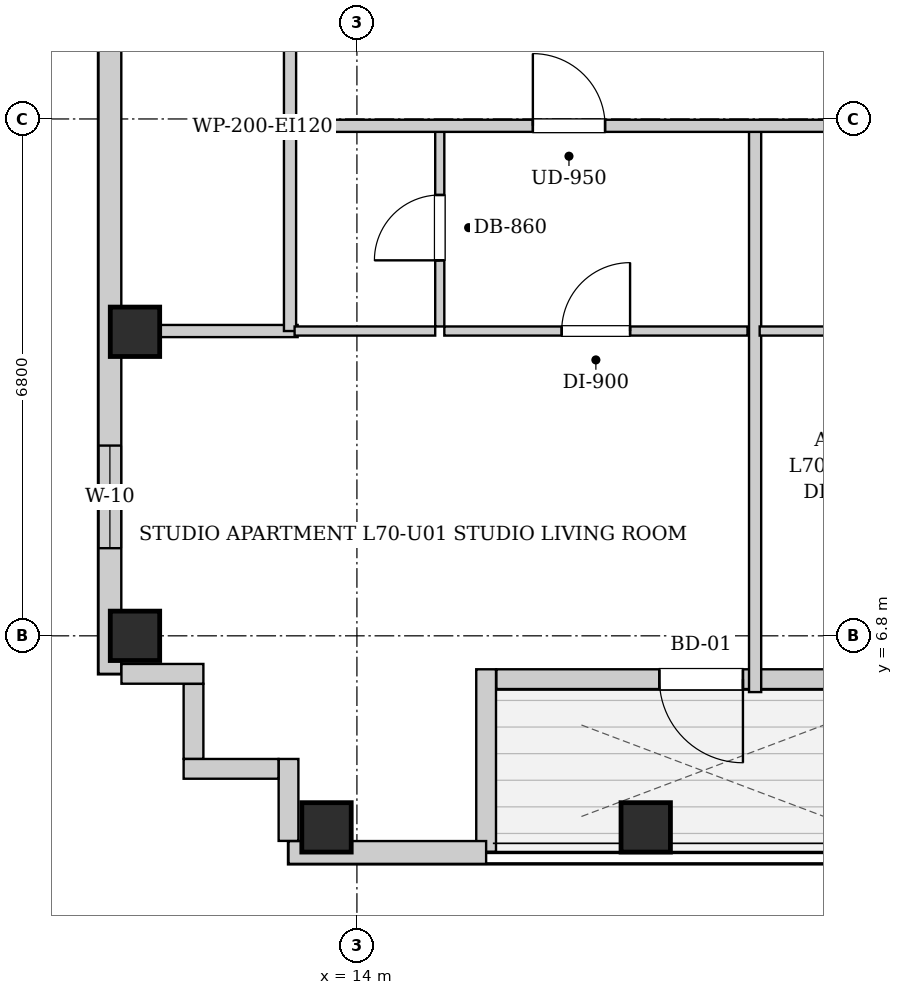
"""IFC4 building model, lengths in metres.
Left out: names, types, materials, properties, quantities, classifications, styles, units other than length and angle.
Written with IfcOpenShell. Run it as: python <this file> out.ifc"""

import sys

from ifc_helpers import new_model, si_unit, direction, frame, frame_2d, origin, origin_2d, place, context, subcontext, project, spatial, rectangle, extrude, element, fill, save


model = new_model("IFC4")
c1 = context("Model", 3, precision=1e-05, world=origin(), true_north=direction((0.0, 1.0)))
c2 = subcontext(c1, "Body", "Model", "MODEL_VIEW")
j1 = project(units=[si_unit("LENGTHUNIT", "METRE"), si_unit("PLANEANGLEUNIT", "RADIAN")], contexts=[c1])
p1 = place(None, origin())
s1 = spatial("IfcSite", under=j1, at=p1, CompositionType="ELEMENT")
p2 = place(p1, origin())
s2 = spatial("IfcBuilding", under=s1, at=p2, CompositionType="ELEMENT")
p3 = place(p2, frame((0.0, 0.0, 241.1)))
s3 = spatial("IfcBuildingStorey", under=s2, at=p3, CompositionType="ELEMENT", Elevation=241.1)
for number, where, z_axis, x_axis in (
    (1, (13.6, 4.28, 0.0), (0.0, 0.0, 1.0), (1.0, 0.0, 0.0)),
    (2, (17.8, 4.28, 0.0), (0.0, 0.0, 1.0), (1.0, 0.0, 0.0)),
    (3, (11.08, 6.8, 0.0), (0.0, 0.0, 1.0), (1.0, 0.0, 0.0)),
    (4, (11.08, 10.8, 0.0), (0.0, 0.0, 1.0), (1.0, 0.0, 0.0)),
):
    element("IfcColumn", number, at=place(p3, frame(where, z_axis=z_axis, x_axis=x_axis)), inside=s3, PredefinedType="COLUMN", context=c2, shape_type="SweptSolid", body=[
        extrude(rectangle(XDim=0.65, YDim=0.65, at=origin_2d()), origin(), (0.0, 0.0, 1.0), 3.4),
    ])
p4 = place(p3, frame((21.266, 6.23, 0.0), z_axis=(0.0, 0.0, 1.0), x_axis=(-1.0, 0.0, 0.0)))
e5 = element("IfcWall", 5, at=p4, inside=s3, PredefinedType="SOLIDWALL", context=c2, shape_type="SweptSolid", body=[
    extrude(rectangle(XDim=5.432, YDim=0.26, at=frame_2d((2.716, 0.0))), origin(), (0.0, 0.0, 1.0), 3.14),
])
p5 = place(p4, frame((2.187, 0.0, 0.0)))
e6 = element("IfcOpeningElement", 6, at=p5, cuts=e5, PredefinedType="OPENING", context=c2, shape_type="SweptSolid", body=[
    extrude(rectangle(XDim=1.1, YDim=2.0, at=frame_2d((0.55, 1.0))), frame((0.0, 0.14, 0.0), z_axis=(0.0, -1.0, 0.0), x_axis=(1.0, 0.0, 0.0)), (0.0, 0.0, 1.0), 0.28),
])
p6 = place(p3, frame((15.7, 6.36, 0.0), z_axis=(0.0, 0.0, 1.0), x_axis=(0.0, -1.0, 0.0)))
e7 = element("IfcWall", 7, at=p6, inside=s3, PredefinedType="SOLIDWALL", context=c2, shape_type="SweptSolid", body=[
    extrude(rectangle(XDim=2.4, YDim=0.26, at=frame_2d((1.2, 0.0))), origin(), (0.0, 0.0, 1.0), 3.14),
])
p7 = place(p3, frame((15.7, 3.95, 0.0), z_axis=(0.0, 0.0, 1.0), x_axis=(-1.0, 0.0, 0.0)))
e8 = element("IfcWall", 8, at=p7, inside=s3, PredefinedType="SOLIDWALL", context=c2, shape_type="SweptSolid", body=[
    extrude(rectangle(XDim=2.6, YDim=0.3, at=frame_2d((1.3, 0.0))), origin(), (0.0, 0.0, 1.0), 3.14),
])
p8 = place(p3, frame((10.75, 6.3, 0.0), z_axis=(0.0, 0.0, 1.0), x_axis=(0.0, 1.0, 0.0)))
e9 = element("IfcWall", 9, at=p8, inside=s3, PredefinedType="SOLIDWALL", context=c2, shape_type="SweptSolid", body=[
    extrude(rectangle(XDim=31.4, YDim=0.3, at=frame_2d((15.7, 0.0))), origin(), (0.0, 0.0, 1.0), 3.14),
])
p9 = place(p8, frame((1.653, 0.0, 0.55)))
e10 = element("IfcOpeningElement", 10, at=p9, cuts=e9, PredefinedType="OPENING", context=c2, shape_type="SweptSolid", body=[
    extrude(rectangle(XDim=1.35, YDim=1.2, at=frame_2d((0.675, 0.6))), frame((0.0, 0.16, 0.0), z_axis=(0.0, -1.0, 0.0), x_axis=(1.0, 0.0, 0.0)), (0.0, 0.0, 1.0), 0.32),
])
p10 = place(p8, frame((11.194, 0.0, 0.55)))
e11 = element("IfcOpeningElement", 11, at=p10, cuts=e9, PredefinedType="OPENING", context=c2, shape_type="SweptSolid", body=[
    extrude(rectangle(XDim=1.35, YDim=1.2, at=frame_2d((0.675, 0.6))), frame((0.0, 0.16, 0.0), z_axis=(0.0, -1.0, 0.0), x_axis=(1.0, 0.0, 0.0)), (0.0, 0.0, 1.0), 0.32),
])
p11 = place(p8, frame((9.185, 0.0, 0.55)))
e12 = element("IfcOpeningElement", 12, at=p11, cuts=e9, PredefinedType="OPENING", context=c2, shape_type="SweptSolid", body=[
    extrude(rectangle(XDim=1.35, YDim=1.2, at=frame_2d((0.675, 0.6))), frame((0.0, 0.16, 0.0), z_axis=(0.0, -1.0, 0.0), x_axis=(1.0, 0.0, 0.0)), (0.0, 0.0, 1.0), 0.32),
])
p12 = place(p8, frame((18.2, 0.0, 0.55)))
e13 = element("IfcOpeningElement", 13, at=p12, cuts=e9, PredefinedType="OPENING", context=c2, shape_type="SweptSolid", body=[
    extrude(rectangle(XDim=1.35, YDim=1.2, at=frame_2d((0.675, 0.6))), frame((0.0, 0.16, 0.0), z_axis=(0.0, -1.0, 0.0), x_axis=(1.0, 0.0, 0.0)), (0.0, 0.0, 1.0), 0.32),
])
p13 = place(p8, frame((19.81, 0.0, 0.55)))
e14 = element("IfcOpeningElement", 14, at=p13, cuts=e9, PredefinedType="OPENING", context=c2, shape_type="SweptSolid", body=[
    extrude(rectangle(XDim=1.35, YDim=1.2, at=frame_2d((0.675, 0.6))), frame((0.0, 0.16, 0.0), z_axis=(0.0, -1.0, 0.0), x_axis=(1.0, 0.0, 0.0)), (0.0, 0.0, 1.0), 0.32),
])
p14 = place(p3, frame((13.1, 4.102, 0.0), z_axis=(0.0, 0.0, 1.0), x_axis=(0.0, 1.0, 0.0)))
e15 = element("IfcWall", 15, at=p14, inside=s3, PredefinedType="SOLIDWALL", context=c2, shape_type="SweptSolid", body=[
    extrude(rectangle(XDim=1.078, YDim=0.26, at=frame_2d((0.539, 0.0))), origin(), (0.0, 0.0, 1.0), 3.14),
])
p15 = place(p3, frame((12.968, 5.05, 0.0), z_axis=(0.0, 0.0, 1.0), x_axis=(-1.0, 0.0, 0.0)))
e16 = element("IfcWall", 16, at=p15, inside=s3, PredefinedType="SOLIDWALL", context=c2, shape_type="SweptSolid", body=[
    extrude(rectangle(XDim=1.248, YDim=0.26, at=frame_2d((0.624, 0.0))), origin(), (0.0, 0.0, 1.0), 3.14),
])
p16 = place(p3, frame((11.85, 5.182, 0.0), z_axis=(0.0, 0.0, 1.0), x_axis=(0.0, 1.0, 0.0)))
e17 = element("IfcWall", 17, at=p16, inside=s3, PredefinedType="SOLIDWALL", context=c2, shape_type="SweptSolid", body=[
    extrude(rectangle(XDim=0.986, YDim=0.26, at=frame_2d((0.493, 0.0))), origin(), (0.0, 0.0, 1.0), 3.14),
])
p17 = place(p3, frame((11.98, 6.3, 0.0), z_axis=(0.0, 0.0, 1.0), x_axis=(-1.0, 0.0, 0.0)))
e18 = element("IfcWall", 18, at=p17, inside=s3, PredefinedType="SOLIDWALL", context=c2, shape_type="SweptSolid", body=[
    extrude(rectangle(XDim=1.078, YDim=0.26, at=frame_2d((0.539, 0.0))), origin(), (0.0, 0.0, 1.0), 3.14),
])
p18 = place(p3, frame((13.12, 13.51, 0.0), z_axis=(0.0, 0.0, 1.0), x_axis=(0.0, 1.0, 0.0)))
e19 = element("IfcWall", 19, at=p18, inside=s3, PredefinedType="PARTITIONING", context=c2, shape_type="SweptSolid", body=[
    extrude(rectangle(XDim=1.58, YDim=0.16, at=frame_2d((0.79, 0.0))), origin(), (0.0, 0.0, 1.0), 3.14),
])
p19 = place(p3, frame((10.88, 10.81, 0.0), z_axis=(0.0, 0.0, 1.0), x_axis=(1.0, 0.0, 0.0)))
e20 = element("IfcWall", 20, at=p19, inside=s3, PredefinedType="PARTITIONING", context=c2, shape_type="SweptSolid", body=[
    extrude(rectangle(XDim=2.34, YDim=0.16, at=frame_2d((1.17, 0.0))), origin(), (0.0, 0.0, 1.0), 3.14),
])
p20 = place(p3, frame((13.12, 10.81, 0.0), z_axis=(0.0, 0.0, 1.0), x_axis=(0.0, 1.0, 0.0)))
e21 = element("IfcWall", 21, at=p20, inside=s3, PredefinedType="PARTITIONING", context=c2, shape_type="SweptSolid", body=[
    extrude(rectangle(XDim=2.66, YDim=0.16, at=frame_2d((1.33, 0.0))), origin(), (0.0, 0.0, 1.0), 3.14),
])
p21 = place(p3, frame((15.09, 10.87, 0.0), z_axis=(0.0, 0.0, 1.0), x_axis=(0.0, 1.0, 0.0)))
e22 = element("IfcWall", 22, at=p21, inside=s3, PredefinedType="PARTITIONING", context=c2, shape_type="SweptSolid", body=[
    extrude(rectangle(XDim=2.6, YDim=0.12, at=frame_2d((1.3, 0.0))), origin(), (0.0, 0.0, 1.0), 3.14),
])
p22 = place(p21, frame((0.87, 0.0, 0.0)))
e23 = element("IfcOpeningElement", 23, at=p22, cuts=e22, PredefinedType="OPENING", context=c2, shape_type="SweptSolid", body=[
    extrude(rectangle(XDim=0.86, YDim=2.05, at=frame_2d((0.43, 1.025))), frame((0.0, 0.07, 0.0), z_axis=(0.0, -1.0, 0.0), x_axis=(1.0, 0.0, 0.0)), (0.0, 0.0, 1.0), 0.14),
])
p23 = place(p3, frame((13.18, 10.81, 0.0), z_axis=(0.0, 0.0, 1.0), x_axis=(1.0, 0.0, 0.0)))
e24 = element("IfcWall", 24, at=p23, inside=s3, PredefinedType="PARTITIONING", context=c2, shape_type="SweptSolid", body=[
    extrude(rectangle(XDim=1.85, YDim=0.12, at=frame_2d((0.925, 0.0))), origin(), (0.0, 0.0, 1.0), 3.14),
])
p24 = place(p3, frame((15.15, 10.81, 0.0), z_axis=(0.0, 0.0, 1.0), x_axis=(1.0, 0.0, 0.0)))
e25 = element("IfcWall", 25, at=p24, inside=s3, PredefinedType="PARTITIONING", context=c2, shape_type="SweptSolid", body=[
    extrude(rectangle(XDim=3.989, YDim=0.12, at=frame_2d((1.995, 0.0))), origin(), (0.0, 0.0, 1.0), 3.14),
])
p25 = place(p24, frame((1.544, 0.0, 0.0)))
e26 = element("IfcOpeningElement", 26, at=p25, cuts=e25, PredefinedType="OPENING", context=c2, shape_type="SweptSolid", body=[
    extrude(rectangle(XDim=0.9, YDim=2.05, at=frame_2d((0.45, 1.025))), frame((0.0, 0.07, 0.0), z_axis=(0.0, -1.0, 0.0), x_axis=(1.0, 0.0, 0.0)), (0.0, 0.0, 1.0), 0.14),
])
p26 = place(p3, frame((19.239, 6.06, 0.0), z_axis=(0.0, 0.0, 1.0), x_axis=(0.0, 1.0, 0.0)))
e27 = element("IfcWall", 27, at=p26, inside=s3, PredefinedType="PARTITIONING", context=c2, shape_type="SweptSolid", body=[
    extrude(rectangle(XDim=7.41, YDim=0.16, at=frame_2d((3.705, 0.0))), origin(), (0.0, 0.0, 1.0), 3.14),
])
p27 = place(p3, frame((19.299, 10.81, 0.0), z_axis=(0.0, 0.0, 1.0), x_axis=(1.0, 0.0, 0.0)))
e28 = element("IfcWall", 28, at=p27, inside=s3, PredefinedType="PARTITIONING", context=c2, shape_type="SweptSolid", body=[
    extrude(rectangle(XDim=2.4, YDim=0.12, at=frame_2d((1.2, 0.0))), origin(), (0.0, 0.0, 1.0), 3.14),
])
p28 = place(p3, frame((13.15, 13.51, 0.0), z_axis=(0.0, 0.0, 1.0), x_axis=(1.0, 0.0, 0.0)))
e29 = element("IfcWall", 29, at=p28, inside=s3, PredefinedType="PARTITIONING", context=c2, shape_type="SweptSolid", body=[
    extrude(rectangle(XDim=24.6, YDim=0.16, at=frame_2d((12.3, 0.0))), origin(), (0.0, 0.0, 1.0), 3.14),
])
p29 = place(p28, frame((3.165, 0.0, 0.0)))
e30 = element("IfcOpeningElement", 30, at=p29, cuts=e29, PredefinedType="OPENING", context=c2, shape_type="SweptSolid", body=[
    extrude(rectangle(XDim=0.95, YDim=2.1, at=frame_2d((0.475, 1.05))), frame((0.0, 0.09, 0.0), z_axis=(0.0, -1.0, 0.0), x_axis=(1.0, 0.0, 0.0)), (0.0, 0.0, 1.0), 0.18),
])
p30 = place(p28, frame((10.414, 0.0, 0.0)))
e31 = element("IfcOpeningElement", 31, at=p30, cuts=e29, PredefinedType="OPENING", context=c2, shape_type="SweptSolid", body=[
    extrude(rectangle(XDim=0.95, YDim=2.1, at=frame_2d((0.475, 1.05))), frame((0.0, 0.09, 0.0), z_axis=(0.0, -1.0, 0.0), x_axis=(1.0, 0.0, 0.0)), (0.0, 0.0, 1.0), 0.18),
])
p31 = place(p22, origin())
e32 = element("IfcDoor", 32, at=p31, inside=s3, OperationType="SINGLE_SWING_LEFT", PredefinedType="DOOR", context=c2, shape_type="SweptSolid", body=[
    extrude(rectangle(XDim=0.86, YDim=2.05, at=frame_2d((0.43, 1.025))), frame((0.0, 0.025, 0.0), z_axis=(0.0, -1.0, 0.0), x_axis=(1.0, 0.0, 0.0)), (0.0, 0.0, 1.0), 0.05),
])
fill(e23, e32)
p32 = place(p25, origin())
e33 = element("IfcDoor", 33, at=p32, inside=s3, OperationType="SINGLE_SWING_RIGHT", PredefinedType="DOOR", context=c2, shape_type="SweptSolid", body=[
    extrude(rectangle(XDim=0.9, YDim=2.05, at=frame_2d((0.45, 1.025))), frame((0.0, 0.025, 0.0), z_axis=(0.0, -1.0, 0.0), x_axis=(1.0, 0.0, 0.0)), (0.0, 0.0, 1.0), 0.05),
])
fill(e26, e33)
p33 = place(p29, origin())
e34 = element("IfcDoor", 34, at=p33, inside=s3, OperationType="SINGLE_SWING_LEFT", PredefinedType="DOOR", context=c2, shape_type="SweptSolid", body=[
    extrude(rectangle(XDim=0.95, YDim=2.1, at=frame_2d((0.475, 1.05))), frame((0.0, 0.025, 0.0), z_axis=(0.0, -1.0, 0.0), x_axis=(1.0, 0.0, 0.0)), (0.0, 0.0, 1.0), 0.05),
])
fill(e30, e34)
p34 = place(p5, origin())
e35 = element("IfcDoor", 35, at=p34, inside=s3, OperationType="SINGLE_SWING_LEFT", PredefinedType="DOOR", context=c2, shape_type="SweptSolid", body=[
    extrude(rectangle(XDim=1.1, YDim=2.0, at=frame_2d((0.55, 1.0))), frame((0.0, 0.025, 0.0), z_axis=(0.0, -1.0, 0.0), x_axis=(1.0, 0.0, 0.0)), (0.0, 0.0, 1.0), 0.05),
])
fill(e6, e35)
p35 = place(p9, origin())
e36 = element("IfcWindow", 36, at=p35, inside=s3, PartitioningType="SINGLE_PANEL", PredefinedType="WINDOW", context=c2, shape_type="SweptSolid", body=[
    extrude(rectangle(XDim=1.35, YDim=1.2, at=frame_2d((0.675, 0.6))), frame((0.0, 0.03, 0.0), z_axis=(0.0, -1.0, 0.0), x_axis=(1.0, 0.0, 0.0)), (0.0, 0.0, 1.0), 0.06),
])
fill(e10, e36)
save(model, sys.argv[1])
